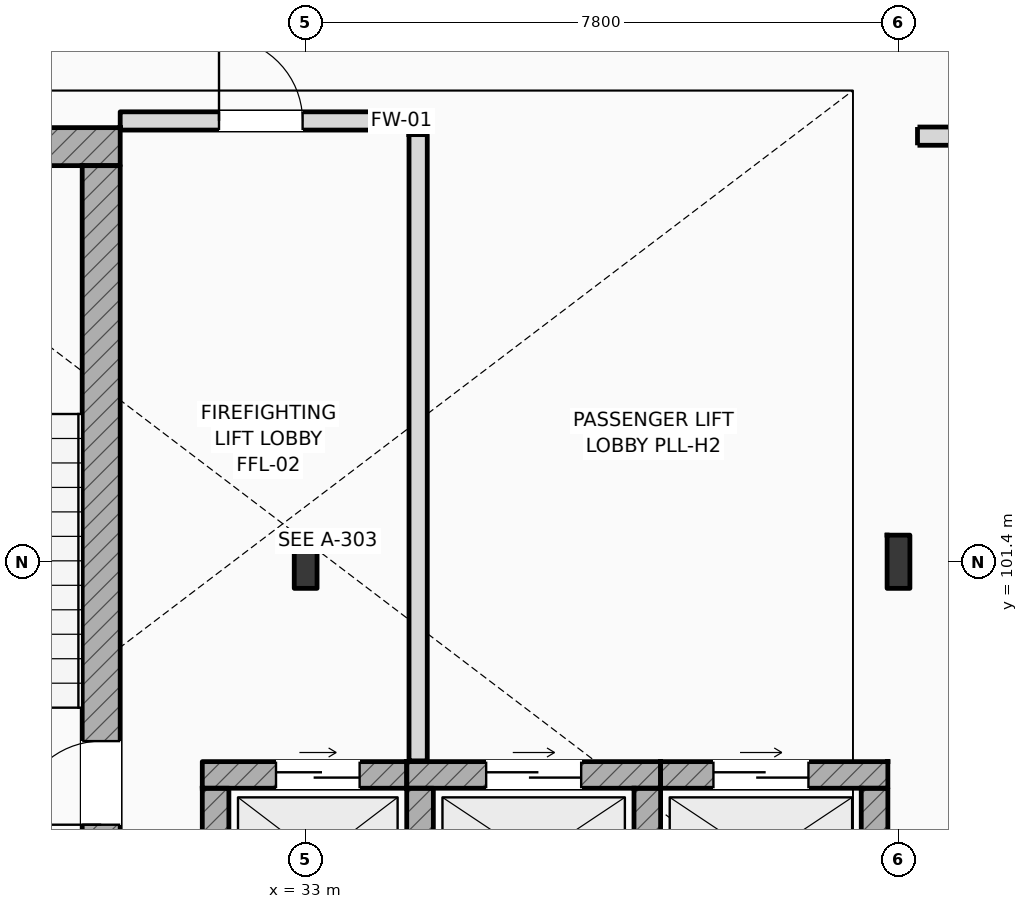
"""IFC4 building model, lengths in metres.
Left out: names, types, materials, properties, quantities, classifications, styles, units other than length and angle.
Written with IfcOpenShell. Run it as: python <this file> out.ifc"""

import sys

from ifc_helpers import new_model, si_unit, direction, frame, frame_2d, origin, origin_2d, place, context, subcontext, project, spatial, rectangle, i_section, extrude, element, fill, save


model = new_model("IFC4")
c1 = context("Model", 3, precision=1e-05, world=origin(), true_north=direction((0.0, 1.0)))
c2 = subcontext(c1, "Body", "Model", "MODEL_VIEW")
j1 = project(units=[si_unit("LENGTHUNIT", "METRE"), si_unit("PLANEANGLEUNIT", "RADIAN")], contexts=[c1])
p1 = place(None, origin())
s1 = spatial("IfcSite", under=j1, at=p1, CompositionType="ELEMENT")
p2 = place(p1, origin())
s2 = spatial("IfcBuilding", under=s1, at=p2, CompositionType="ELEMENT")
p3 = place(p2, frame((0.0, 0.0, -4.5)))
s3 = spatial("IfcBuildingStorey", under=s2, at=p3, CompositionType="ELEMENT", Elevation=-4.5)
for number, where, z_axis, x_axis in (
    (1, (33.0, 101.4, 0.0), (0.0, 0.0, 1.0), (1.0, 0.0, 0.0)),
    (2, (40.8, 101.4, 0.0), (0.0, 0.0, 1.0), (1.0, 0.0, 0.0)),
):
    element("IfcColumn", number, at=place(p3, frame(where, z_axis=z_axis, x_axis=x_axis)), inside=s3, PredefinedType="COLUMN", context=c2, shape_type="SweptSolid", body=[
        extrude(i_section(OverallWidth=0.3, OverallDepth=0.7, WebThickness=0.017, FlangeThickness=0.032, FilletRadius=0.027, at=origin_2d()), origin(), (0.0, 0.0, 1.0), 4.5),
    ])
p4 = place(p3, frame((25.4, 106.862, 0.0), z_axis=(0.0, 0.0, 1.0), x_axis=(1.0, 0.0, 0.0)))
e3 = element("IfcWall", 3, at=p4, inside=s3, PredefinedType="SHEAR", context=c2, shape_type="SweptSolid", body=[
    extrude(rectangle(XDim=5.16, YDim=0.5, at=frame_2d((2.58, 0.0))), origin(), (0.0, 0.0, 1.0), 4.5),
])
p5 = place(p3, frame((30.31, 97.5, 0.0), z_axis=(0.0, 0.0, 1.0), x_axis=(0.0, 1.0, 0.0)))
e4 = element("IfcWall", 4, at=p5, inside=s3, PredefinedType="SHEAR", context=c2, shape_type="SweptSolid", body=[
    extrude(rectangle(XDim=9.112, YDim=0.5, at=frame_2d((4.556, 0.0))), origin(), (0.0, 0.0, 1.0), 4.5),
])
p6 = place(p5, frame((0.44, 0.0, 0.0)))
e5 = element("IfcOpeningElement", 5, at=p6, cuts=e4, PredefinedType="OPENING", context=c2, shape_type="SweptSolid", body=[
    extrude(rectangle(XDim=1.1, YDim=2.2, at=frame_2d((0.55, 1.1))), frame((0.0, 0.26, 0.0), z_axis=(0.0, -1.0, 0.0), x_axis=(1.0, 0.0, 0.0)), (0.0, 0.0, 1.0), 0.52),
])
p7 = place(p3, frame((31.64, 98.595, 0.0), z_axis=(0.0, 0.0, 1.0), x_axis=(1.0, 0.0, 0.0)))
e6 = element("IfcWall", 6, at=p7, inside=s3, PredefinedType="SHEAR", context=c2, shape_type="SweptSolid", body=[
    extrude(rectangle(XDim=2.69, YDim=0.35, at=frame_2d((1.345, 0.0))), origin(), (0.0, 0.0, 1.0), 4.1),
])
p8 = place(p7, frame((0.97, 0.0, 0.0)))
e7 = element("IfcOpeningElement", 7, at=p8, cuts=e6, PredefinedType="OPENING", context=c2, shape_type="SweptSolid", body=[
    extrude(rectangle(XDim=1.1, YDim=2.2, at=frame_2d((0.55, 1.1))), frame((0.0, 0.185, 0.0), z_axis=(0.0, -1.0, 0.0), x_axis=(1.0, 0.0, 0.0)), (0.0, 0.0, 1.0), 0.37),
])
p9 = place(p3, frame((31.815, 96.58, 0.0), z_axis=(0.0, 0.0, 1.0), x_axis=(0.0, 1.0, 0.0)))
e8 = element("IfcWall", 8, at=p9, inside=s3, PredefinedType="SHEAR", context=c2, shape_type="SweptSolid", body=[
    extrude(rectangle(XDim=1.84, YDim=0.35, at=frame_2d((0.92, 0.0))), origin(), (0.0, 0.0, 1.0), 4.1),
])
p10 = place(p3, frame((34.33, 98.595, 0.0), z_axis=(0.0, 0.0, 1.0), x_axis=(1.0, 0.0, 0.0)))
e9 = element("IfcWall", 9, at=p10, inside=s3, PredefinedType="SHEAR", context=c2, shape_type="SweptSolid", body=[
    extrude(rectangle(XDim=3.34, YDim=0.35, at=frame_2d((1.67, 0.0))), origin(), (0.0, 0.0, 1.0), 4.1),
])
p11 = place(p10, frame((1.045, 0.0, 0.0)))
e10 = element("IfcOpeningElement", 10, at=p11, cuts=e9, PredefinedType="OPENING", context=c2, shape_type="SweptSolid", body=[
    extrude(rectangle(XDim=1.25, YDim=2.25, at=frame_2d((0.625, 1.125))), frame((0.0, 0.185, 0.0), z_axis=(0.0, -1.0, 0.0), x_axis=(1.0, 0.0, 0.0)), (0.0, 0.0, 1.0), 0.37),
])
for number, where, z_axis, x_axis in (
    (11, (34.505, 96.58, 0.0), (0.0, 0.0, 1.0), (0.0, 1.0, 0.0)),
    (12, (37.495, 96.58, 0.0), (0.0, 0.0, 1.0), (0.0, 1.0, 0.0)),
):
    element("IfcWall", number, at=place(p3, frame(where, z_axis=z_axis, x_axis=x_axis)), inside=s3, PredefinedType="SHEAR", context=c2, shape_type="SweptSolid", body=[
        extrude(rectangle(XDim=1.84, YDim=0.35, at=frame_2d((0.92, 0.0))), origin(), (0.0, 0.0, 1.0), 4.1),
    ])
p12 = place(p3, frame((37.67, 98.595, 0.0), z_axis=(0.0, 0.0, 1.0), x_axis=(1.0, 0.0, 0.0)))
e13 = element("IfcWall", 13, at=p12, inside=s3, PredefinedType="SHEAR", context=c2, shape_type="SweptSolid", body=[
    extrude(rectangle(XDim=2.99, YDim=0.35, at=frame_2d((1.495, 0.0))), origin(), (0.0, 0.0, 1.0), 4.1),
])
p13 = place(p12, frame((0.695, 0.0, 0.0)))
e14 = element("IfcOpeningElement", 14, at=p13, cuts=e13, PredefinedType="OPENING", context=c2, shape_type="SweptSolid", body=[
    extrude(rectangle(XDim=1.25, YDim=2.25, at=frame_2d((0.625, 1.125))), frame((0.0, 0.185, 0.0), z_axis=(0.0, -1.0, 0.0), x_axis=(1.0, 0.0, 0.0)), (0.0, 0.0, 1.0), 0.37),
])
p14 = place(p3, frame((40.485, 96.58, 0.0), z_axis=(0.0, 0.0, 1.0), x_axis=(0.0, 1.0, 0.0)))
e15 = element("IfcWall", 15, at=p14, inside=s3, PredefinedType="SHEAR", context=c2, shape_type="SweptSolid", body=[
    extrude(rectangle(XDim=1.84, YDim=0.35, at=frame_2d((0.92, 0.0))), origin(), (0.0, 0.0, 1.0), 3.64),
])
p15 = place(p3, frame((34.48, 98.78, 0.0), z_axis=(0.0, 0.0, 1.0), x_axis=(0.0, 1.0, 0.0)))
e16 = element("IfcWall", 16, at=p15, inside=s3, PredefinedType="STANDARD", context=c2, shape_type="SweptSolid", body=[
    extrude(rectangle(XDim=8.24, YDim=0.24, at=frame_2d((4.12, 0.0))), origin(), (0.0, 0.0, 1.0), 4.1),
])
p16 = place(p3, frame((30.56, 107.2, 0.0), z_axis=(0.0, 0.0, 1.0), x_axis=(1.0, 0.0, 0.0)))
e17 = element("IfcWall", 17, at=p16, inside=s3, PredefinedType="STANDARD", context=c2, shape_type="SweptSolid", body=[
    extrude(rectangle(XDim=4.1, YDim=0.24, at=frame_2d((2.05, 0.0))), origin(), (0.0, 0.0, 1.0), 4.1),
])
p17 = place(p16, frame((1.3, 0.0, 0.0)))
e18 = element("IfcOpeningElement", 18, at=p17, cuts=e17, PredefinedType="OPENING", context=c2, shape_type="SweptSolid", body=[
    extrude(rectangle(XDim=1.1, YDim=2.2, at=frame_2d((0.55, 1.1))), frame((0.0, 0.13, 0.0), z_axis=(0.0, -1.0, 0.0), x_axis=(1.0, 0.0, 0.0)), (0.0, 0.0, 1.0), 0.26),
])
p18 = place(p3, frame((41.05, 107.0, 0.0), z_axis=(0.0, 0.0, 1.0), x_axis=(1.0, 0.0, 0.0)))
e19 = element("IfcWall", 19, at=p18, inside=s3, PredefinedType="STANDARD", context=c2, shape_type="SweptSolid", body=[
    extrude(rectangle(XDim=22.85, YDim=0.24, at=frame_2d((11.425, 0.0))), origin(), (0.0, 0.0, 1.0), 4.1),
])
p19 = place(p18, frame((10.875, 0.0, 0.0)))
e20 = element("IfcOpeningElement", 20, at=p19, cuts=e19, PredefinedType="OPENING", context=c2, shape_type="SweptSolid", body=[
    extrude(rectangle(XDim=1.1, YDim=2.2, at=frame_2d((0.55, 1.1))), frame((0.0, 0.13, 0.0), z_axis=(0.0, -1.0, 0.0), x_axis=(1.0, 0.0, 0.0)), (0.0, 0.0, 1.0), 0.26),
])
p20 = place(p6, origin())
e21 = element("IfcDoor", 21, at=p20, inside=s3, OperationType="SINGLE_SWING_LEFT", PredefinedType="DOOR", context=c2, shape_type="SweptSolid", body=[
    extrude(rectangle(XDim=1.1, YDim=2.2, at=frame_2d((0.55, 1.1))), frame((0.0, 0.025, 0.0), z_axis=(0.0, -1.0, 0.0), x_axis=(1.0, 0.0, 0.0)), (0.0, 0.0, 1.0), 0.05),
])
fill(e5, e21)
p21 = place(p8, origin())
e22 = element("IfcDoor", 22, at=p21, inside=s3, OperationType="SLIDING_TO_LEFT", PredefinedType="DOOR", context=c2, shape_type="SweptSolid", body=[
    extrude(rectangle(XDim=1.1, YDim=2.2, at=frame_2d((0.55, 1.1))), frame((0.0, 0.025, 0.0), z_axis=(0.0, -1.0, 0.0), x_axis=(1.0, 0.0, 0.0)), (0.0, 0.0, 1.0), 0.05),
])
fill(e7, e22)
p22 = place(p11, origin())
e23 = element("IfcDoor", 23, at=p22, inside=s3, OperationType="SLIDING_TO_LEFT", PredefinedType="DOOR", context=c2, shape_type="SweptSolid", body=[
    extrude(rectangle(XDim=1.25, YDim=2.25, at=frame_2d((0.625, 1.125))), frame((0.0, 0.025, 0.0), z_axis=(0.0, -1.0, 0.0), x_axis=(1.0, 0.0, 0.0)), (0.0, 0.0, 1.0), 0.05),
])
fill(e10, e23)
p23 = place(p13, origin())
e24 = element("IfcDoor", 24, at=p23, inside=s3, OperationType="SLIDING_TO_LEFT", PredefinedType="DOOR", context=c2, shape_type="SweptSolid", body=[
    extrude(rectangle(XDim=1.25, YDim=2.25, at=frame_2d((0.625, 1.125))), frame((0.0, 0.025, 0.0), z_axis=(0.0, -1.0, 0.0), x_axis=(1.0, 0.0, 0.0)), (0.0, 0.0, 1.0), 0.05),
])
fill(e14, e24)
p24 = place(p17, origin())
e25 = element("IfcDoor", 25, at=p24, inside=s3, OperationType="SINGLE_SWING_LEFT", PredefinedType="DOOR", context=c2, shape_type="SweptSolid", body=[
    extrude(rectangle(XDim=1.1, YDim=2.2, at=frame_2d((0.55, 1.1))), frame((0.0, 0.025, 0.0), z_axis=(0.0, -1.0, 0.0), x_axis=(1.0, 0.0, 0.0)), (0.0, 0.0, 1.0), 0.05),
])
fill(e18, e25)
save(model, sys.argv[1])
